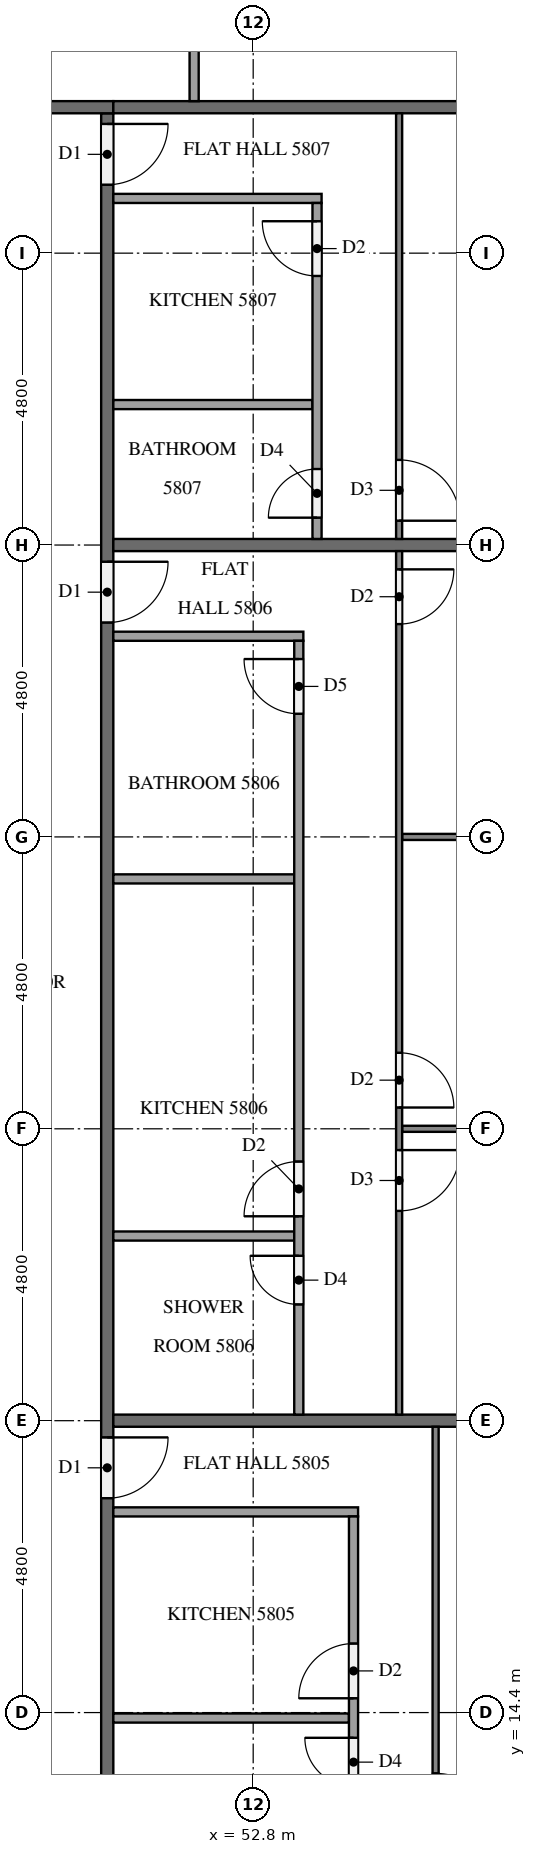
"""IFC4 building model, lengths in metres.
Left out: names, types, materials, properties, quantities, classifications, styles, units other than length and angle.
Written with IfcOpenShell. Run it as: python <this file> out.ifc"""

import sys

from ifc_helpers import new_model, si_unit, direction, frame, frame_2d, origin, place, context, subcontext, project, spatial, rectangle, extrude, element, fill, save


model = new_model("IFC4")
c1 = context("Model", 3, precision=1e-05, world=origin(), true_north=direction((0.0, 1.0)))
c2 = subcontext(c1, "Body", "Model", "MODEL_VIEW")
j1 = project(units=[si_unit("LENGTHUNIT", "METRE"), si_unit("PLANEANGLEUNIT", "RADIAN")], contexts=[c1])
p1 = place(None, origin())
s1 = spatial("IfcSite", under=j1, at=p1, CompositionType="ELEMENT")
p2 = place(p1, origin())
s2 = spatial("IfcBuilding", under=s1, at=p2, CompositionType="ELEMENT")
p3 = place(p2, frame((0.0, 0.0, 222.8)))
s3 = spatial("IfcBuildingStorey", under=s2, at=p3, CompositionType="ELEMENT", Elevation=222.8)
p4 = place(p3, frame((50.4, 40.7, 0.0), z_axis=(0.0, 0.0, 1.0), x_axis=(0.0, -1.0, 0.0)))
e1 = element("IfcWall", 1, at=p4, inside=s3, PredefinedType="PARTITIONING", context=c2, shape_type="SweptSolid", body=[
    extrude(rectangle(XDim=28.6, YDim=0.2, at=frame_2d((14.3, 0.0))), origin(), (0.0, 0.0, 1.0), 3.2),
])
p5 = place(p4, frame((21.775, 0.0, 0.0)))
e2 = element("IfcOpeningElement", 2, at=p5, cuts=e1, PredefinedType="OPENING", context=c2, shape_type="SweptSolid", body=[
    extrude(rectangle(XDim=1.0, YDim=2.1, at=frame_2d((0.5, 1.05))), frame((0.0, 0.11, 0.0), z_axis=(0.0, -1.0, 0.0), x_axis=(1.0, 0.0, 0.0)), (0.0, 0.0, 1.0), 0.22),
])
p6 = place(p4, frame((7.375, 0.0, 0.0)))
e3 = element("IfcOpeningElement", 3, at=p6, cuts=e1, PredefinedType="OPENING", context=c2, shape_type="SweptSolid", body=[
    extrude(rectangle(XDim=1.0, YDim=2.1, at=frame_2d((0.5, 1.05))), frame((0.0, 0.11, 0.0), z_axis=(0.0, -1.0, 0.0), x_axis=(1.0, 0.0, 0.0)), (0.0, 0.0, 1.0), 0.22),
])
p7 = place(p4, frame((0.175, 0.0, 0.0)))
e4 = element("IfcOpeningElement", 4, at=p7, cuts=e1, PredefinedType="OPENING", context=c2, shape_type="SweptSolid", body=[
    extrude(rectangle(XDim=1.0, YDim=2.1, at=frame_2d((0.5, 1.05))), frame((0.0, 0.11, 0.0), z_axis=(0.0, -1.0, 0.0), x_axis=(1.0, 0.0, 0.0)), (0.0, 0.0, 1.0), 0.22),
])
p8 = place(p3, frame((11.9, 40.8, 0.0), z_axis=(0.0, 0.0, 1.0), x_axis=(1.0, 0.0, 0.0)))
e5 = element("IfcWall", 5, at=p8, inside=s3, PredefinedType="PARTITIONING", context=c2, shape_type="SweptSolid", body=[
    extrude(rectangle(XDim=38.6, YDim=0.2, at=frame_2d((19.3, 0.0))), origin(), (0.0, 0.0, 1.0), 3.2),
])
p9 = place(p8, frame((33.975, 0.0, 0.0)))
e6 = element("IfcOpeningElement", 6, at=p9, cuts=e5, PredefinedType="OPENING", context=c2, shape_type="SweptSolid", body=[
    extrude(rectangle(XDim=1.0, YDim=2.1, at=frame_2d((0.5, 1.05))), frame((0.0, 0.11, 0.0), z_axis=(0.0, -1.0, 0.0), x_axis=(1.0, 0.0, 0.0)), (0.0, 0.0, 1.0), 0.22),
])
p10 = place(p8, frame((14.725, 0.0, 0.0)))
e7 = element("IfcOpeningElement", 7, at=p10, cuts=e5, PredefinedType="OPENING", context=c2, shape_type="SweptSolid", body=[
    extrude(rectangle(XDim=1.1, YDim=2.1, at=frame_2d((0.55, 1.05))), frame((0.0, 0.11, 0.0), z_axis=(0.0, -1.0, 0.0), x_axis=(1.0, 0.0, 0.0)), (0.0, 0.0, 1.0), 0.22),
])
p11 = place(p8, frame((7.575, 0.0, 0.0)))
e8 = element("IfcOpeningElement", 8, at=p11, cuts=e5, PredefinedType="OPENING", context=c2, shape_type="SweptSolid", body=[
    extrude(rectangle(XDim=1.0, YDim=2.1, at=frame_2d((0.5, 1.05))), frame((0.0, 0.11, 0.0), z_axis=(0.0, -1.0, 0.0), x_axis=(1.0, 0.0, 0.0)), (0.0, 0.0, 1.0), 0.22),
])
p12 = place(p8, frame((6.025, 0.0, 0.0)))
e9 = element("IfcOpeningElement", 9, at=p12, cuts=e5, PredefinedType="OPENING", context=c2, shape_type="SweptSolid", body=[
    extrude(rectangle(XDim=1.0, YDim=2.1, at=frame_2d((0.5, 1.05))), frame((0.0, 0.11, 0.0), z_axis=(0.0, -1.0, 0.0), x_axis=(1.0, 0.0, 0.0)), (0.0, 0.0, 1.0), 0.22),
])
p13 = place(p3, frame((50.5, 19.2, 0.0), z_axis=(0.0, 0.0, 1.0), x_axis=(1.0, 0.0, 0.0)))
e10 = element("IfcWall", 10, at=p13, inside=s3, PredefinedType="PARTITIONING", context=c2, shape_type="SweptSolid", body=[
    extrude(rectangle(XDim=11.575, YDim=0.2, at=frame_2d((5.788, 0.0))), origin(), (0.0, 0.0, 1.0), 3.2),
])
for number, where, z_axis, x_axis in (
    (11, (50.5, 33.6, 0.0), (0.0, 0.0, 1.0), (1.0, 0.0, 0.0)),
    (12, (50.5, 40.8, 0.0), (0.0, 0.0, 1.0), (1.0, 0.0, 0.0)),
):
    element("IfcWall", number, at=place(p3, frame(where, z_axis=z_axis, x_axis=x_axis)), inside=s3, PredefinedType="PARTITIONING", context=c2, shape_type="SweptSolid", body=[
        extrude(rectangle(XDim=11.8, YDim=0.2, at=frame_2d((5.9, 0.0))), origin(), (0.0, 0.0, 1.0), 3.2),
    ])
p14 = place(p3, frame((55.8, 19.1, 0.0), z_axis=(0.0, 0.0, 1.0), x_axis=(0.0, -1.0, 0.0)))
e13 = element("IfcWall", 13, at=p14, inside=s3, PredefinedType="PARTITIONING", context=c2, shape_type="SweptSolid", body=[
    extrude(rectangle(XDim=7.0, YDim=0.1, at=frame_2d((3.5, 0.0))), origin(), (0.0, 0.0, 1.0), 3.2),
])
p15 = place(p14, frame((5.7, 0.0, 0.0)))
e14 = element("IfcOpeningElement", 14, at=p15, cuts=e13, PredefinedType="OPENING", context=c2, shape_type="SweptSolid", body=[
    extrude(rectangle(XDim=1.0, YDim=2.1, at=frame_2d((0.5, 1.05))), frame((0.0, 0.06, 0.0), z_axis=(0.0, -1.0, 0.0), x_axis=(1.0, 0.0, 0.0)), (0.0, 0.0, 1.0), 0.12),
])
p16 = place(p3, frame((50.5, 14.31, 0.0), z_axis=(0.0, 0.0, 1.0), x_axis=(1.0, 0.0, 0.0)))
e15 = element("IfcWall", 15, at=p16, inside=s3, PredefinedType="PARTITIONING", context=c2, shape_type="SweptSolid", body=[
    extrude(rectangle(XDim=3.875, YDim=0.15, at=frame_2d((1.938, 0.0))), origin(), (0.0, 0.0, 1.0), 3.2),
])
p17 = place(p3, frame((50.5, 17.7, 0.0), z_axis=(0.0, 0.0, 1.0), x_axis=(1.0, 0.0, 0.0)))
e16 = element("IfcWall", 16, at=p17, inside=s3, PredefinedType="PARTITIONING", context=c2, shape_type="SweptSolid", body=[
    extrude(rectangle(XDim=4.025, YDim=0.15, at=frame_2d((2.012, 0.0))), origin(), (0.0, 0.0, 1.0), 3.2),
])
p18 = place(p3, frame((54.45, 12.1, 0.0), z_axis=(0.0, 0.0, 1.0), x_axis=(0.0, 1.0, 0.0)))
e17 = element("IfcWall", 17, at=p18, inside=s3, PredefinedType="PARTITIONING", context=c2, shape_type="SweptSolid", body=[
    extrude(rectangle(XDim=5.525, YDim=0.15, at=frame_2d((2.762, 0.0))), origin(), (0.0, 0.0, 1.0), 3.2),
])
p19 = place(p18, frame((2.535, 0.0, 0.0)))
e18 = element("IfcOpeningElement", 18, at=p19, cuts=e17, PredefinedType="OPENING", context=c2, shape_type="SweptSolid", body=[
    extrude(rectangle(XDim=0.9, YDim=2.1, at=frame_2d((0.45, 1.05))), frame((0.0, 0.085, 0.0), z_axis=(0.0, -1.0, 0.0), x_axis=(1.0, 0.0, 0.0)), (0.0, 0.0, 1.0), 0.17),
])
p20 = place(p18, frame((1.085, 0.0, 0.0)))
e19 = element("IfcOpeningElement", 19, at=p20, cuts=e17, PredefinedType="OPENING", context=c2, shape_type="SweptSolid", body=[
    extrude(rectangle(XDim=0.8, YDim=2.1, at=frame_2d((0.4, 1.05))), frame((0.0, 0.085, 0.0), z_axis=(0.0, -1.0, 0.0), x_axis=(1.0, 0.0, 0.0)), (0.0, 0.0, 1.0), 0.17),
])
p21 = place(p3, frame((55.25, 28.8, 0.0), z_axis=(0.0, 0.0, 1.0), x_axis=(1.0, 0.0, 0.0)))
e20 = element("IfcWall", 20, at=p21, inside=s3, PredefinedType="PARTITIONING", context=c2, shape_type="SweptSolid", body=[
    extrude(rectangle(XDim=6.825, YDim=0.1, at=frame_2d((3.413, 0.0))), origin(), (0.0, 0.0, 1.0), 3.2),
])
p22 = place(p3, frame((55.25, 24.0, 0.0), z_axis=(0.0, 0.0, 1.0), x_axis=(1.0, 0.0, 0.0)))
e21 = element("IfcWall", 21, at=p22, inside=s3, PredefinedType="PARTITIONING", context=c2, shape_type="SweptSolid", body=[
    extrude(rectangle(XDim=7.05, YDim=0.1, at=frame_2d((3.525, 0.0))), origin(), (0.0, 0.0, 1.0), 3.2),
])
p23 = place(p3, frame((55.2, 33.5, 0.0), z_axis=(0.0, 0.0, 1.0), x_axis=(0.0, -1.0, 0.0)))
e22 = element("IfcWall", 22, at=p23, inside=s3, PredefinedType="PARTITIONING", context=c2, shape_type="SweptSolid", body=[
    extrude(rectangle(XDim=14.2, YDim=0.1, at=frame_2d((7.1, 0.0))), origin(), (0.0, 0.0, 1.0), 3.2),
])
p24 = place(p23, frame((0.3, 0.0, 0.0)))
e23 = element("IfcOpeningElement", 23, at=p24, cuts=e22, PredefinedType="OPENING", context=c2, shape_type="SweptSolid", body=[
    extrude(rectangle(XDim=0.9, YDim=2.1, at=frame_2d((0.45, 1.05))), frame((0.0, 0.06, 0.0), z_axis=(0.0, -1.0, 0.0), x_axis=(1.0, 0.0, 0.0)), (0.0, 0.0, 1.0), 0.12),
])
p25 = place(p23, frame((8.25, 0.0, 0.0)))
e24 = element("IfcOpeningElement", 24, at=p25, cuts=e22, PredefinedType="OPENING", context=c2, shape_type="SweptSolid", body=[
    extrude(rectangle(XDim=0.9, YDim=2.1, at=frame_2d((0.45, 1.05))), frame((0.0, 0.06, 0.0), z_axis=(0.0, -1.0, 0.0), x_axis=(1.0, 0.0, 0.0)), (0.0, 0.0, 1.0), 0.12),
])
p26 = place(p23, frame((9.85, 0.0, 0.0)))
e25 = element("IfcOpeningElement", 25, at=p26, cuts=e22, PredefinedType="OPENING", context=c2, shape_type="SweptSolid", body=[
    extrude(rectangle(XDim=1.0, YDim=2.1, at=frame_2d((0.5, 1.05))), frame((0.0, 0.06, 0.0), z_axis=(0.0, -1.0, 0.0), x_axis=(1.0, 0.0, 0.0)), (0.0, 0.0, 1.0), 0.12),
])
for number, where, z_axis, x_axis in (
    (26, (50.5, 28.11, 0.0), (0.0, 0.0, 1.0), (1.0, 0.0, 0.0)),
    (27, (50.5, 22.237, 0.0), (0.0, 0.0, 1.0), (1.0, 0.0, 0.0)),
):
    element("IfcWall", number, at=place(p3, frame(where, z_axis=z_axis, x_axis=x_axis)), inside=s3, PredefinedType="PARTITIONING", context=c2, shape_type="SweptSolid", body=[
        extrude(rectangle(XDim=2.975, YDim=0.15, at=frame_2d((1.488, 0.0))), origin(), (0.0, 0.0, 1.0), 3.2),
    ])
p27 = place(p3, frame((50.5, 32.1, 0.0), z_axis=(0.0, 0.0, 1.0), x_axis=(1.0, 0.0, 0.0)))
e28 = element("IfcWall", 28, at=p27, inside=s3, PredefinedType="PARTITIONING", context=c2, shape_type="SweptSolid", body=[
    extrude(rectangle(XDim=3.125, YDim=0.15, at=frame_2d((1.562, 0.0))), origin(), (0.0, 0.0, 1.0), 3.2),
])
p28 = place(p3, frame((53.55, 19.3, 0.0), z_axis=(0.0, 0.0, 1.0), x_axis=(0.0, 1.0, 0.0)))
e29 = element("IfcWall", 29, at=p28, inside=s3, PredefinedType="PARTITIONING", context=c2, shape_type="SweptSolid", body=[
    extrude(rectangle(XDim=12.725, YDim=0.15, at=frame_2d((6.362, 0.0))), origin(), (0.0, 0.0, 1.0), 3.2),
])
p29 = place(p28, frame((11.525, 0.0, 0.0)))
e30 = element("IfcOpeningElement", 30, at=p29, cuts=e29, PredefinedType="OPENING", context=c2, shape_type="SweptSolid", body=[
    extrude(rectangle(XDim=0.9, YDim=2.1, at=frame_2d((0.45, 1.05))), frame((0.0, 0.085, 0.0), z_axis=(0.0, -1.0, 0.0), x_axis=(1.0, 0.0, 0.0)), (0.0, 0.0, 1.0), 0.17),
])
p30 = place(p28, frame((3.261, 0.0, 0.0)))
e31 = element("IfcOpeningElement", 31, at=p30, cuts=e29, PredefinedType="OPENING", context=c2, shape_type="SweptSolid", body=[
    extrude(rectangle(XDim=0.9, YDim=2.1, at=frame_2d((0.45, 1.05))), frame((0.0, 0.085, 0.0), z_axis=(0.0, -1.0, 0.0), x_axis=(1.0, 0.0, 0.0)), (0.0, 0.0, 1.0), 0.17),
])
p31 = place(p28, frame((1.812, 0.0, 0.0)))
e32 = element("IfcOpeningElement", 32, at=p31, cuts=e29, PredefinedType="OPENING", context=c2, shape_type="SweptSolid", body=[
    extrude(rectangle(XDim=0.8, YDim=2.1, at=frame_2d((0.4, 1.05))), frame((0.0, 0.085, 0.0), z_axis=(0.0, -1.0, 0.0), x_axis=(1.0, 0.0, 0.0)), (0.0, 0.0, 1.0), 0.17),
])
p32 = place(p3, frame((55.2, 40.7, 0.0), z_axis=(0.0, 0.0, 1.0), x_axis=(0.0, -1.0, 0.0)))
e33 = element("IfcWall", 33, at=p32, inside=s3, PredefinedType="PARTITIONING", context=c2, shape_type="SweptSolid", body=[
    extrude(rectangle(XDim=7.0, YDim=0.1, at=frame_2d((3.5, 0.0))), origin(), (0.0, 0.0, 1.0), 3.2),
])
p33 = place(p32, frame((5.7, 0.0, 0.0)))
e34 = element("IfcOpeningElement", 34, at=p33, cuts=e33, PredefinedType="OPENING", context=c2, shape_type="SweptSolid", body=[
    extrude(rectangle(XDim=1.0, YDim=2.1, at=frame_2d((0.5, 1.05))), frame((0.0, 0.06, 0.0), z_axis=(0.0, -1.0, 0.0), x_axis=(1.0, 0.0, 0.0)), (0.0, 0.0, 1.0), 0.12),
])
p34 = place(p3, frame((50.5, 35.91, 0.0), z_axis=(0.0, 0.0, 1.0), x_axis=(1.0, 0.0, 0.0)))
e35 = element("IfcWall", 35, at=p34, inside=s3, PredefinedType="PARTITIONING", context=c2, shape_type="SweptSolid", body=[
    extrude(rectangle(XDim=3.275, YDim=0.15, at=frame_2d((1.637, 0.0))), origin(), (0.0, 0.0, 1.0), 3.2),
])
p35 = place(p3, frame((50.5, 39.3, 0.0), z_axis=(0.0, 0.0, 1.0), x_axis=(1.0, 0.0, 0.0)))
e36 = element("IfcWall", 36, at=p35, inside=s3, PredefinedType="PARTITIONING", context=c2, shape_type="SweptSolid", body=[
    extrude(rectangle(XDim=3.425, YDim=0.15, at=frame_2d((1.712, 0.0))), origin(), (0.0, 0.0, 1.0), 3.2),
])
p36 = place(p3, frame((53.85, 33.7, 0.0), z_axis=(0.0, 0.0, 1.0), x_axis=(0.0, 1.0, 0.0)))
e37 = element("IfcWall", 37, at=p36, inside=s3, PredefinedType="PARTITIONING", context=c2, shape_type="SweptSolid", body=[
    extrude(rectangle(XDim=5.525, YDim=0.15, at=frame_2d((2.763, 0.0))), origin(), (0.0, 0.0, 1.0), 3.2),
])
p37 = place(p36, frame((4.325, 0.0, 0.0)))
e38 = element("IfcOpeningElement", 38, at=p37, cuts=e37, PredefinedType="OPENING", context=c2, shape_type="SweptSolid", body=[
    extrude(rectangle(XDim=0.9, YDim=2.1, at=frame_2d((0.45, 1.05))), frame((0.0, 0.085, 0.0), z_axis=(0.0, -1.0, 0.0), x_axis=(1.0, 0.0, 0.0)), (0.0, 0.0, 1.0), 0.17),
])
p38 = place(p36, frame((0.35, 0.0, 0.0)))
e39 = element("IfcOpeningElement", 39, at=p38, cuts=e37, PredefinedType="OPENING", context=c2, shape_type="SweptSolid", body=[
    extrude(rectangle(XDim=0.8, YDim=2.1, at=frame_2d((0.4, 1.05))), frame((0.0, 0.085, 0.0), z_axis=(0.0, -1.0, 0.0), x_axis=(1.0, 0.0, 0.0)), (0.0, 0.0, 1.0), 0.17),
])
p39 = place(p3, frame((51.829, 40.9, 0.0), z_axis=(0.0, 0.0, 1.0), x_axis=(0.0, 1.0, 0.0)))
e40 = element("IfcWall", 40, at=p39, inside=s3, PredefinedType="PARTITIONING", context=c2, shape_type="SweptSolid", body=[
    extrude(rectangle(XDim=2.975, YDim=0.15, at=frame_2d((1.488, 0.0))), origin(), (0.0, 0.0, 1.0), 3.2),
])
p40 = place(p5, origin())
e41 = element("IfcDoor", 41, at=p40, inside=s3, OperationType="SINGLE_SWING_LEFT", PredefinedType="DOOR", context=c2, shape_type="SweptSolid", body=[
    extrude(rectangle(XDim=1.0, YDim=2.1, at=frame_2d((0.5, 1.05))), frame((0.0, 0.025, 0.0), z_axis=(0.0, -1.0, 0.0), x_axis=(1.0, 0.0, 0.0)), (0.0, 0.0, 1.0), 0.05),
])
fill(e2, e41)
p41 = place(p6, origin())
e42 = element("IfcDoor", 42, at=p41, inside=s3, OperationType="SINGLE_SWING_LEFT", PredefinedType="DOOR", context=c2, shape_type="SweptSolid", body=[
    extrude(rectangle(XDim=1.0, YDim=2.1, at=frame_2d((0.5, 1.05))), frame((0.0, 0.025, 0.0), z_axis=(0.0, -1.0, 0.0), x_axis=(1.0, 0.0, 0.0)), (0.0, 0.0, 1.0), 0.05),
])
fill(e3, e42)
p42 = place(p7, origin())
e43 = element("IfcDoor", 43, at=p42, inside=s3, OperationType="SINGLE_SWING_LEFT", PredefinedType="DOOR", context=c2, shape_type="SweptSolid", body=[
    extrude(rectangle(XDim=1.0, YDim=2.1, at=frame_2d((0.5, 1.05))), frame((0.0, 0.025, 0.0), z_axis=(0.0, -1.0, 0.0), x_axis=(1.0, 0.0, 0.0)), (0.0, 0.0, 1.0), 0.05),
])
fill(e4, e43)
p43 = place(p15, origin())
e44 = element("IfcDoor", 44, at=p43, inside=s3, OperationType="SINGLE_SWING_RIGHT", PredefinedType="DOOR", context=c2, shape_type="SweptSolid", body=[
    extrude(rectangle(XDim=1.0, YDim=2.1, at=frame_2d((0.5, 1.05))), frame((0.0, 0.025, 0.0), z_axis=(0.0, -1.0, 0.0), x_axis=(1.0, 0.0, 0.0)), (0.0, 0.0, 1.0), 0.05),
])
fill(e14, e44)
p44 = place(p19, origin())
e45 = element("IfcDoor", 45, at=p44, inside=s3, OperationType="SINGLE_SWING_LEFT", PredefinedType="DOOR", context=c2, shape_type="SweptSolid", body=[
    extrude(rectangle(XDim=0.9, YDim=2.1, at=frame_2d((0.45, 1.05))), frame((0.0, 0.025, 0.0), z_axis=(0.0, -1.0, 0.0), x_axis=(1.0, 0.0, 0.0)), (0.0, 0.0, 1.0), 0.05),
])
fill(e18, e45)
p45 = place(p20, origin())
e46 = element("IfcDoor", 46, at=p45, inside=s3, OperationType="SINGLE_SWING_RIGHT", PredefinedType="DOOR", context=c2, shape_type="SweptSolid", body=[
    extrude(rectangle(XDim=0.8, YDim=2.1, at=frame_2d((0.4, 1.05))), frame((0.0, 0.025, 0.0), z_axis=(0.0, -1.0, 0.0), x_axis=(1.0, 0.0, 0.0)), (0.0, 0.0, 1.0), 0.05),
])
fill(e19, e46)
p46 = place(p24, origin())
e47 = element("IfcDoor", 47, at=p46, inside=s3, OperationType="SINGLE_SWING_LEFT", PredefinedType="DOOR", context=c2, shape_type="SweptSolid", body=[
    extrude(rectangle(XDim=0.9, YDim=2.1, at=frame_2d((0.45, 1.05))), frame((0.0, 0.025, 0.0), z_axis=(0.0, -1.0, 0.0), x_axis=(1.0, 0.0, 0.0)), (0.0, 0.0, 1.0), 0.05),
])
fill(e23, e47)
p47 = place(p25, origin())
e48 = element("IfcDoor", 48, at=p47, inside=s3, OperationType="SINGLE_SWING_RIGHT", PredefinedType="DOOR", context=c2, shape_type="SweptSolid", body=[
    extrude(rectangle(XDim=0.9, YDim=2.1, at=frame_2d((0.45, 1.05))), frame((0.0, 0.025, 0.0), z_axis=(0.0, -1.0, 0.0), x_axis=(1.0, 0.0, 0.0)), (0.0, 0.0, 1.0), 0.05),
])
fill(e24, e48)
p48 = place(p26, origin())
e49 = element("IfcDoor", 49, at=p48, inside=s3, OperationType="SINGLE_SWING_LEFT", PredefinedType="DOOR", context=c2, shape_type="SweptSolid", body=[
    extrude(rectangle(XDim=1.0, YDim=2.1, at=frame_2d((0.5, 1.05))), frame((0.0, 0.025, 0.0), z_axis=(0.0, -1.0, 0.0), x_axis=(1.0, 0.0, 0.0)), (0.0, 0.0, 1.0), 0.05),
])
fill(e25, e49)
p49 = place(p29, origin())
e50 = element("IfcDoor", 50, at=p49, inside=s3, OperationType="SINGLE_SWING_RIGHT", PredefinedType="DOOR", context=c2, shape_type="SweptSolid", body=[
    extrude(rectangle(XDim=0.9, YDim=2.1, at=frame_2d((0.45, 1.05))), frame((0.0, 0.025, 0.0), z_axis=(0.0, -1.0, 0.0), x_axis=(1.0, 0.0, 0.0)), (0.0, 0.0, 1.0), 0.05),
])
fill(e30, e50)
p50 = place(p30, origin())
e51 = element("IfcDoor", 51, at=p50, inside=s3, OperationType="SINGLE_SWING_LEFT", PredefinedType="DOOR", context=c2, shape_type="SweptSolid", body=[
    extrude(rectangle(XDim=0.9, YDim=2.1, at=frame_2d((0.45, 1.05))), frame((0.0, 0.025, 0.0), z_axis=(0.0, -1.0, 0.0), x_axis=(1.0, 0.0, 0.0)), (0.0, 0.0, 1.0), 0.05),
])
fill(e31, e51)
p51 = place(p31, origin())
e52 = element("IfcDoor", 52, at=p51, inside=s3, OperationType="SINGLE_SWING_RIGHT", PredefinedType="DOOR", context=c2, shape_type="SweptSolid", body=[
    extrude(rectangle(XDim=0.8, YDim=2.1, at=frame_2d((0.4, 1.05))), frame((0.0, 0.025, 0.0), z_axis=(0.0, -1.0, 0.0), x_axis=(1.0, 0.0, 0.0)), (0.0, 0.0, 1.0), 0.05),
])
fill(e32, e52)
p52 = place(p33, origin())
e53 = element("IfcDoor", 53, at=p52, inside=s3, OperationType="SINGLE_SWING_RIGHT", PredefinedType="DOOR", context=c2, shape_type="SweptSolid", body=[
    extrude(rectangle(XDim=1.0, YDim=2.1, at=frame_2d((0.5, 1.05))), frame((0.0, 0.025, 0.0), z_axis=(0.0, -1.0, 0.0), x_axis=(1.0, 0.0, 0.0)), (0.0, 0.0, 1.0), 0.05),
])
fill(e34, e53)
p53 = place(p37, origin())
e54 = element("IfcDoor", 54, at=p53, inside=s3, OperationType="SINGLE_SWING_RIGHT", PredefinedType="DOOR", context=c2, shape_type="SweptSolid", body=[
    extrude(rectangle(XDim=0.9, YDim=2.1, at=frame_2d((0.45, 1.05))), frame((0.0, 0.025, 0.0), z_axis=(0.0, -1.0, 0.0), x_axis=(1.0, 0.0, 0.0)), (0.0, 0.0, 1.0), 0.05),
])
fill(e38, e54)
p54 = place(p38, origin())
e55 = element("IfcDoor", 55, at=p54, inside=s3, OperationType="SINGLE_SWING_LEFT", PredefinedType="DOOR", context=c2, shape_type="SweptSolid", body=[
    extrude(rectangle(XDim=0.8, YDim=2.1, at=frame_2d((0.4, 1.05))), frame((0.0, 0.025, 0.0), z_axis=(0.0, -1.0, 0.0), x_axis=(1.0, 0.0, 0.0)), (0.0, 0.0, 1.0), 0.05),
])
fill(e39, e55)
save(model, sys.argv[1])
